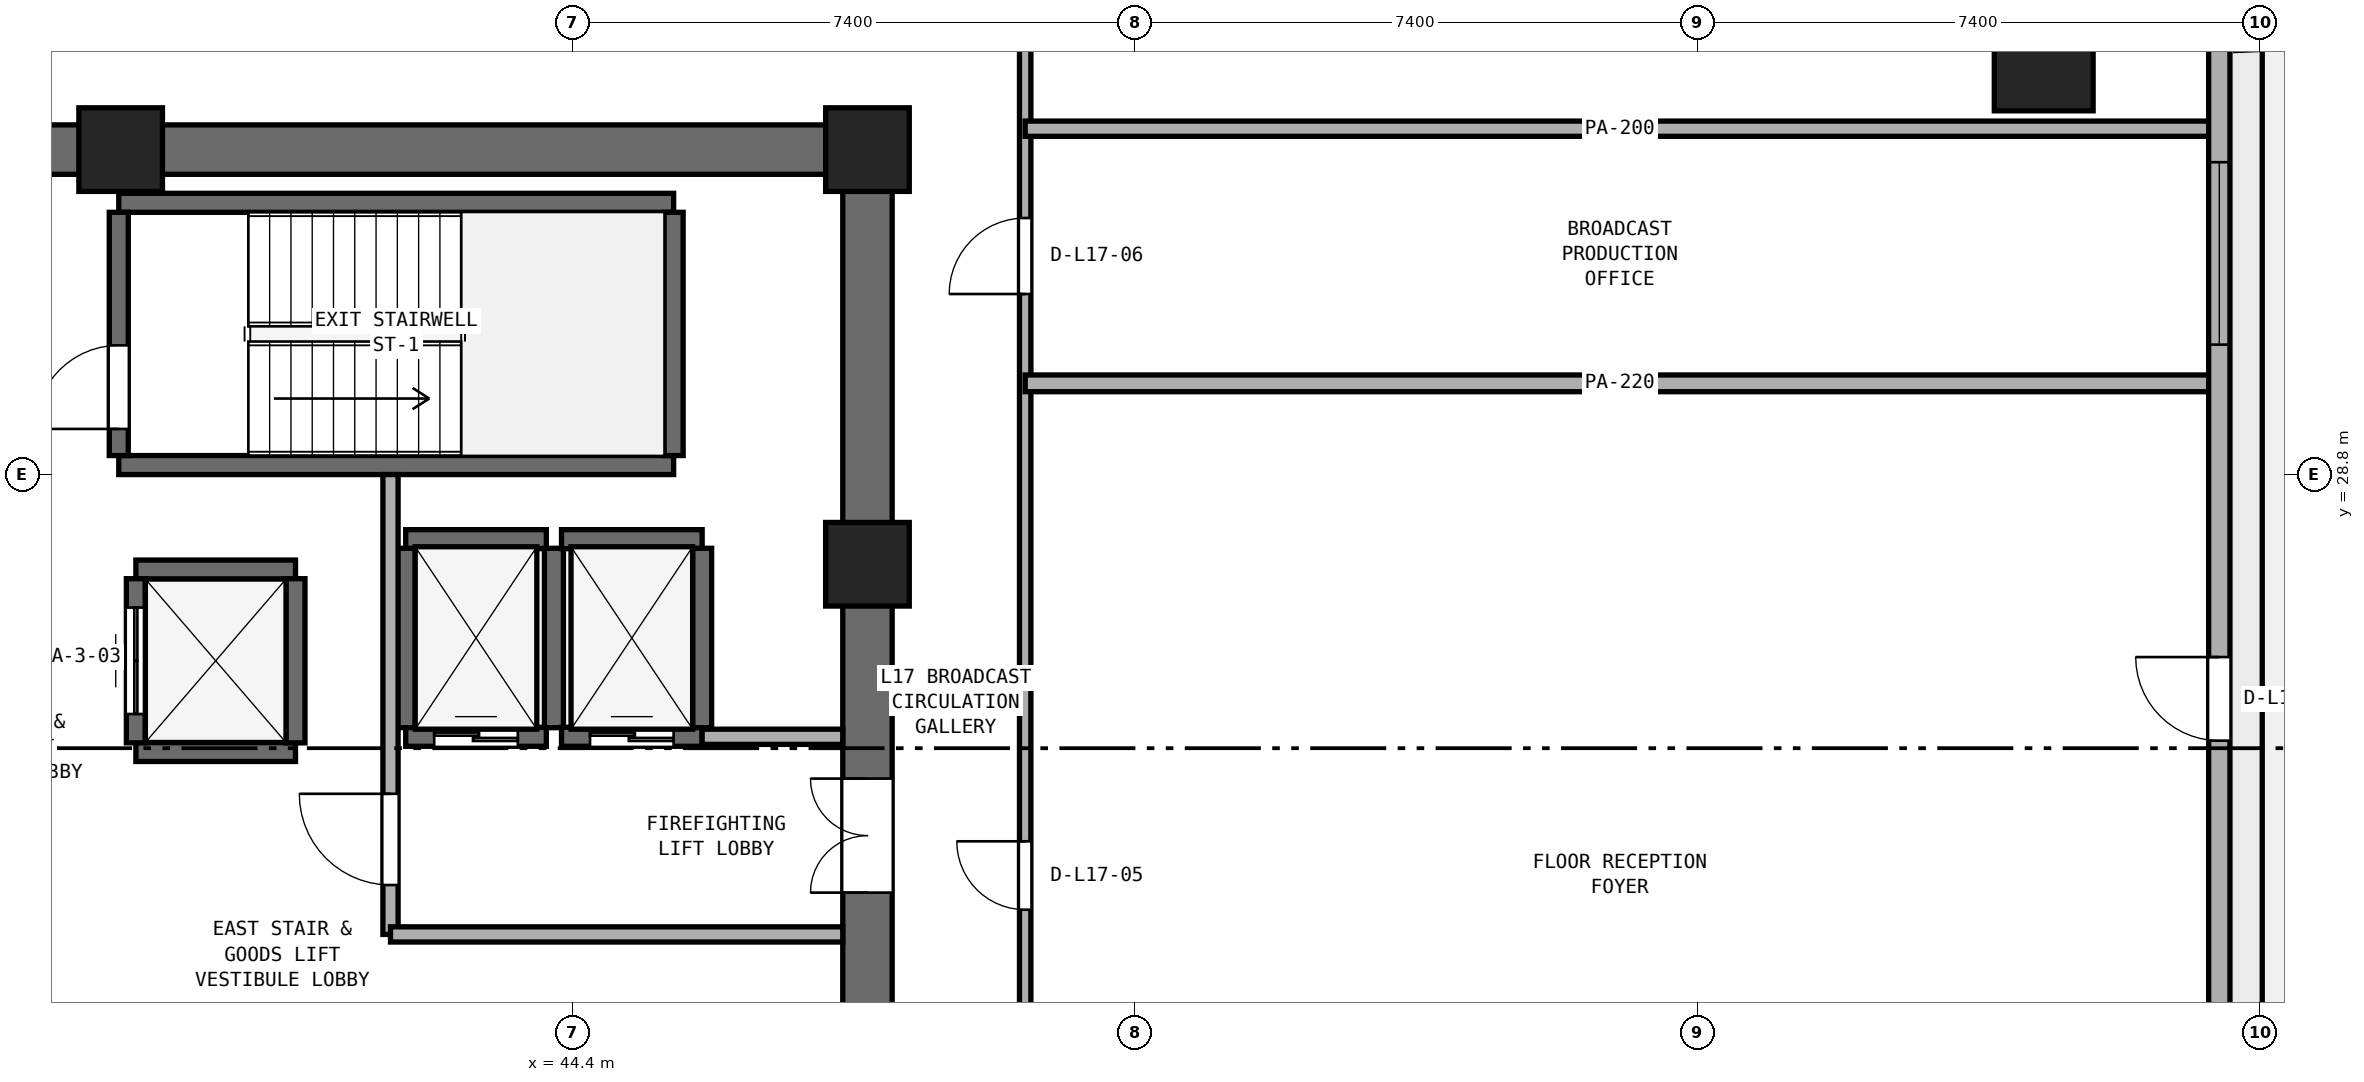
"""IFC4 building model, lengths in metres.
Left out: names, types, materials, properties, quantities, classifications, styles, units other than length and angle.
Written with IfcOpenShell. Run it as: python <this file> out.ifc"""

import sys

from ifc_helpers import new_model, si_unit, direction, frame, frame_2d, origin, origin_2d, place, context, subcontext, project, spatial, rectangle, extrude, element, fill, save


model = new_model("IFC4")
c1 = context("Model", 3, precision=1e-05, world=origin(), true_north=direction((0.0, 1.0)))
c2 = subcontext(c1, "Body", "Model", "MODEL_VIEW")
j1 = project(units=[si_unit("LENGTHUNIT", "METRE"), si_unit("PLANEANGLEUNIT", "RADIAN")], contexts=[c1])
p1 = place(None, origin())
s1 = spatial("IfcSite", under=j1, at=p1, CompositionType="ELEMENT")
p2 = place(p1, origin())
s2 = spatial("IfcBuilding", under=s1, at=p2, CompositionType="ELEMENT")
p3 = place(p2, frame((0.0, 0.0, 70.6)))
s3 = spatial("IfcBuildingStorey", under=s2, at=p3, CompositionType="ELEMENT", Elevation=70.6)
p4 = place(p3, frame((25.4, 33.075, 0.0), z_axis=(0.0, 0.0, 1.0), x_axis=(1.0, 0.0, 0.0)))
e1 = element("IfcWall", 1, at=p4, inside=s3, PredefinedType="SHEAR", context=c2, shape_type="SweptSolid", body=[
    extrude(rectangle(XDim=23.2, YDim=0.65, at=frame_2d((11.6, 0.0))), origin(), (0.0, 0.0, 1.0), 3.525),
])
p5 = place(p3, frame((48.275, 17.65, 0.0), z_axis=(0.0, 0.0, 1.0), x_axis=(0.0, 1.0, 0.0)))
e2 = element("IfcWall", 2, at=p5, inside=s3, PredefinedType="SHEAR", context=c2, shape_type="SweptSolid", body=[
    extrude(rectangle(XDim=15.1, YDim=0.65, at=frame_2d((7.55, 0.0))), origin(), (0.0, 0.0, 1.0), 3.525),
])
p6 = place(p5, frame((5.65, 0.0, 0.0)))
e3 = element("IfcOpeningElement", 3, at=p6, cuts=e2, PredefinedType="OPENING", context=c2, shape_type="SweptSolid", body=[
    extrude(rectangle(XDim=1.5, YDim=2.15, at=frame_2d((0.75, 1.075))), frame((0.0, 0.335, 0.0), z_axis=(0.0, -1.0, 0.0), x_axis=(1.0, 0.0, 0.0)), (0.0, 0.0, 1.0), 0.67),
])
for number, where, z_axis, x_axis in (
    (4, (48.275, 27.62, 0.0), (0.0, 0.0, 1.0), (1.0, 0.0, 0.0)),
    (5, (48.275, 33.075, 0.0), (0.0, 0.0, 1.0), (1.0, 0.0, 0.0)),
    (6, (38.45, 33.075, 0.0), (0.0, 0.0, 1.0), (1.0, 0.0, 0.0)),
):
    element("IfcColumn", number, at=place(p3, frame(where, z_axis=z_axis, x_axis=x_axis)), inside=s3, PredefinedType="PILASTER", context=c2, shape_type="SweptSolid", body=[
        extrude(rectangle(XDim=1.1, YDim=1.1, at=origin_2d()), origin(), (0.0, 0.0, 1.0), 3.8),
    ])
p7 = place(p3, frame((63.75, 34.235, 0.0), z_axis=(0.0, 0.0, 1.0), x_axis=(1.0, 0.0, 0.0)))
e7 = element("IfcColumn", 7, at=p7, inside=s3, PredefinedType="COLUMN", context=c2, shape_type="SweptSolid", body=[
    extrude(rectangle(XDim=1.3, YDim=1.3, at=origin_2d()), origin(), (0.0, 0.0, 1.0), 3.8),
])
for number, where, z_axis, x_axis in (
    (8, (38.425, 28.925, 0.0), (0.0, 0.0, 1.0), (1.0, 0.0, 0.0)),
    (9, (38.425, 32.375, 0.0), (0.0, 0.0, 1.0), (1.0, 0.0, 0.0)),
):
    element("IfcWall", number, at=place(p3, frame(where, z_axis=z_axis, x_axis=x_axis)), inside=s3, PredefinedType="SHEAR", context=c2, shape_type="SweptSolid", body=[
        extrude(rectangle(XDim=7.3, YDim=0.25, at=frame_2d((3.65, 0.0))), origin(), (0.0, 0.0, 1.0), 3.525),
    ])
p8 = place(p3, frame((38.425, 29.05, 0.0), z_axis=(0.0, 0.0, 1.0), x_axis=(0.0, 1.0, 0.0)))
e10 = element("IfcWall", 10, at=p8, inside=s3, PredefinedType="SHEAR", context=c2, shape_type="SweptSolid", body=[
    extrude(rectangle(XDim=3.2, YDim=0.25, at=frame_2d((1.6, 0.0))), origin(), (0.0, 0.0, 1.0), 3.525),
])
p9 = place(p8, frame((0.35, 0.0, 0.0)))
e11 = element("IfcOpeningElement", 11, at=p9, cuts=e10, PredefinedType="OPENING", context=c2, shape_type="SweptSolid", body=[
    extrude(rectangle(XDim=1.1, YDim=2.15, at=frame_2d((0.55, 1.075))), frame((0.0, 0.135, 0.0), z_axis=(0.0, -1.0, 0.0), x_axis=(1.0, 0.0, 0.0)), (0.0, 0.0, 1.0), 0.27),
])
p10 = place(p3, frame((45.725, 29.05, 0.0), z_axis=(0.0, 0.0, 1.0), x_axis=(0.0, 1.0, 0.0)))
e12 = element("IfcWall", 12, at=p10, inside=s3, PredefinedType="SHEAR", context=c2, shape_type="SweptSolid", body=[
    extrude(rectangle(XDim=3.2, YDim=0.25, at=frame_2d((1.6, 0.0))), origin(), (0.0, 0.0, 1.0), 3.525),
])
p11 = place(p3, frame((42.2, 25.35, 0.0), z_axis=(0.0, 0.0, 1.0), x_axis=(1.0, 0.0, 0.0)))
e13 = element("IfcWall", 13, at=p11, inside=s3, PredefinedType="SHEAR", context=c2, shape_type="SweptSolid", body=[
    extrude(rectangle(XDim=1.85, YDim=0.25, at=frame_2d((0.925, 0.0))), origin(), (0.0, 0.0, 1.0), 3.525),
])
p12 = place(p11, frame((0.375, 0.0, 0.0)))
e14 = element("IfcOpeningElement", 14, at=p12, cuts=e13, PredefinedType="OPENING", context=c2, shape_type="SweptSolid", body=[
    extrude(rectangle(XDim=1.1, YDim=2.15, at=frame_2d((0.55, 1.075))), frame((0.0, 0.135, 0.0), z_axis=(0.0, -1.0, 0.0), x_axis=(1.0, 0.0, 0.0)), (0.0, 0.0, 1.0), 0.27),
])
p13 = place(p3, frame((42.2, 27.95, 0.0), z_axis=(0.0, 0.0, 1.0), x_axis=(1.0, 0.0, 0.0)))
e15 = element("IfcWall", 15, at=p13, inside=s3, PredefinedType="SHEAR", context=c2, shape_type="SweptSolid", body=[
    extrude(rectangle(XDim=1.85, YDim=0.25, at=frame_2d((0.925, 0.0))), origin(), (0.0, 0.0, 1.0), 3.525),
])
for number, where, z_axis, x_axis in (
    (16, (42.2, 25.47, 0.0), (0.0, 0.0, 1.0), (0.0, 1.0, 0.0)),
    (17, (44.15, 25.47, 0.0), (0.0, 0.0, 1.0), (0.0, 1.0, 0.0)),
):
    element("IfcWall", number, at=place(p3, frame(where, z_axis=z_axis, x_axis=x_axis)), inside=s3, PredefinedType="SHEAR", context=c2, shape_type="SweptSolid", body=[
        extrude(rectangle(XDim=2.36, YDim=0.25, at=frame_2d((1.18, 0.0))), origin(), (0.0, 0.0, 1.0), 3.525),
    ])
p14 = place(p3, frame((44.25, 25.35, 0.0), z_axis=(0.0, 0.0, 1.0), x_axis=(1.0, 0.0, 0.0)))
e18 = element("IfcWall", 18, at=p14, inside=s3, PredefinedType="SHEAR", context=c2, shape_type="SweptSolid", body=[
    extrude(rectangle(XDim=1.85, YDim=0.25, at=frame_2d((0.925, 0.0))), origin(), (0.0, 0.0, 1.0), 3.525),
])
p15 = place(p14, frame((0.375, 0.0, 0.0)))
e19 = element("IfcOpeningElement", 19, at=p15, cuts=e18, PredefinedType="OPENING", context=c2, shape_type="SweptSolid", body=[
    extrude(rectangle(XDim=1.1, YDim=2.15, at=frame_2d((0.55, 1.075))), frame((0.0, 0.135, 0.0), z_axis=(0.0, -1.0, 0.0), x_axis=(1.0, 0.0, 0.0)), (0.0, 0.0, 1.0), 0.27),
])
p16 = place(p3, frame((44.25, 27.95, 0.0), z_axis=(0.0, 0.0, 1.0), x_axis=(1.0, 0.0, 0.0)))
e20 = element("IfcWall", 20, at=p16, inside=s3, PredefinedType="SHEAR", context=c2, shape_type="SweptSolid", body=[
    extrude(rectangle(XDim=1.85, YDim=0.25, at=frame_2d((0.925, 0.0))), origin(), (0.0, 0.0, 1.0), 3.525),
])
p17 = place(p3, frame((46.1, 25.47, 0.0), z_axis=(0.0, 0.0, 1.0), x_axis=(0.0, 1.0, 0.0)))
e21 = element("IfcWall", 21, at=p17, inside=s3, PredefinedType="SHEAR", context=c2, shape_type="SweptSolid", body=[
    extrude(rectangle(XDim=2.36, YDim=0.25, at=frame_2d((1.18, 0.0))), origin(), (0.0, 0.0, 1.0), 3.525),
])
for number, where, z_axis, x_axis in (
    (22, (38.65, 25.15, 0.0), (0.0, 0.0, 1.0), (1.0, 0.0, 0.0)),
    (23, (38.65, 27.55, 0.0), (0.0, 0.0, 1.0), (1.0, 0.0, 0.0)),
):
    element("IfcWall", number, at=place(p3, frame(where, z_axis=z_axis, x_axis=x_axis)), inside=s3, PredefinedType="SHEAR", context=c2, shape_type="SweptSolid", body=[
        extrude(rectangle(XDim=2.1, YDim=0.25, at=frame_2d((1.05, 0.0))), origin(), (0.0, 0.0, 1.0), 3.525),
    ])
p18 = place(p3, frame((38.65, 25.27, 0.0), z_axis=(0.0, 0.0, 1.0), x_axis=(0.0, 1.0, 0.0)))
e24 = element("IfcWall", 24, at=p18, inside=s3, PredefinedType="SHEAR", context=c2, shape_type="SweptSolid", body=[
    extrude(rectangle(XDim=2.16, YDim=0.25, at=frame_2d((1.08, 0.0))), origin(), (0.0, 0.0, 1.0), 3.525),
])
p19 = place(p18, frame((0.38, 0.0, 0.0)))
e25 = element("IfcOpeningElement", 25, at=p19, cuts=e24, PredefinedType="OPENING", context=c2, shape_type="SweptSolid", body=[
    extrude(rectangle(XDim=1.4, YDim=2.2, at=frame_2d((0.7, 1.1))), frame((0.0, 0.135, 0.0), z_axis=(0.0, -1.0, 0.0), x_axis=(1.0, 0.0, 0.0)), (0.0, 0.0, 1.0), 0.27),
])
p20 = place(p3, frame((40.75, 25.27, 0.0), z_axis=(0.0, 0.0, 1.0), x_axis=(0.0, 1.0, 0.0)))
e26 = element("IfcWall", 26, at=p20, inside=s3, PredefinedType="SHEAR", context=c2, shape_type="SweptSolid", body=[
    extrude(rectangle(XDim=2.16, YDim=0.25, at=frame_2d((1.08, 0.0))), origin(), (0.0, 0.0, 1.0), 3.525),
])
p21 = place(p3, frame((42.0, 22.75, 0.0), z_axis=(0.0, 0.0, 1.0), x_axis=(0.0, 1.0, 0.0)))
e27 = element("IfcWall", 27, at=p21, inside=s3, PredefinedType="SOLIDWALL", context=c2, shape_type="SweptSolid", body=[
    extrude(rectangle(XDim=6.05, YDim=0.2, at=frame_2d((3.025, 0.0))), origin(), (0.0, 0.0, 1.0), 3.525),
])
p22 = place(p21, frame((0.65, 0.0, 0.0)))
e28 = element("IfcOpeningElement", 28, at=p22, cuts=e27, PredefinedType="OPENING", context=c2, shape_type="SweptSolid", body=[
    extrude(rectangle(XDim=1.2, YDim=2.15, at=frame_2d((0.6, 1.075))), frame((0.0, 0.11, 0.0), z_axis=(0.0, -1.0, 0.0), x_axis=(1.0, 0.0, 0.0)), (0.0, 0.0, 1.0), 0.22),
])
p23 = place(p3, frame((42.0, 22.75, 0.0), z_axis=(0.0, 0.0, 1.0), x_axis=(1.0, 0.0, 0.0)))
e29 = element("IfcWall", 29, at=p23, inside=s3, PredefinedType="SOLIDWALL", context=c2, shape_type="SweptSolid", body=[
    extrude(rectangle(XDim=5.95, YDim=0.2, at=frame_2d((2.975, 0.0))), origin(), (0.0, 0.0, 1.0), 3.525),
])
p24 = place(p3, frame((46.1, 25.35, 0.0), z_axis=(0.0, 0.0, 1.0), x_axis=(1.0, 0.0, 0.0)))
e30 = element("IfcWall", 30, at=p24, inside=s3, PredefinedType="SOLIDWALL", context=c2, shape_type="SweptSolid", body=[
    extrude(rectangle(XDim=1.85, YDim=0.2, at=frame_2d((0.925, 0.0))), origin(), (0.0, 0.0, 1.0), 3.525),
])
p25 = place(p3, frame((50.35, 15.25, 0.0), z_axis=(0.0, 0.0, 1.0), x_axis=(0.0, 1.0, 0.0)))
e31 = element("IfcWall", 31, at=p25, inside=s3, PredefinedType="PARTITIONING", context=c2, shape_type="SweptSolid", body=[
    extrude(rectangle(XDim=19.9, YDim=0.15, at=frame_2d((9.95, 0.0))), origin(), (0.0, 0.0, 1.0), 3.525),
])
p26 = place(p25, frame((7.825, 0.0, 0.0)))
e32 = element("IfcOpeningElement", 32, at=p26, cuts=e31, PredefinedType="OPENING", context=c2, shape_type="SweptSolid", body=[
    extrude(rectangle(XDim=0.9, YDim=2.1, at=frame_2d((0.45, 1.05))), frame((0.0, 0.085, 0.0), z_axis=(0.0, -1.0, 0.0), x_axis=(1.0, 0.0, 0.0)), (0.0, 0.0, 1.0), 0.17),
])
p27 = place(p25, frame((15.925, 0.0, 0.0)))
e33 = element("IfcOpeningElement", 33, at=p27, cuts=e31, PredefinedType="OPENING", context=c2, shape_type="SweptSolid", body=[
    extrude(rectangle(XDim=1.0, YDim=2.12, at=frame_2d((0.5, 1.06))), frame((0.0, 0.085, 0.0), z_axis=(0.0, -1.0, 0.0), x_axis=(1.0, 0.0, 0.0)), (0.0, 0.0, 1.0), 0.17),
])
p28 = place(p3, frame((50.35, 30.0, 0.0), z_axis=(0.0, 0.0, 1.0), x_axis=(1.0, 0.0, 0.0)))
e34 = element("IfcWall", 34, at=p28, inside=s3, PredefinedType="PARTITIONING", context=c2, shape_type="SweptSolid", body=[
    extrude(rectangle(XDim=15.645, YDim=0.22, at=frame_2d((7.823, 0.0))), origin(), (0.0, 0.0, 1.0), 3.525),
])
p29 = place(p3, frame((50.35, 33.35, 0.0), z_axis=(0.0, 0.0, 1.0), x_axis=(1.0, 0.0, 0.0)))
e35 = element("IfcWall", 35, at=p29, inside=s3, PredefinedType="PARTITIONING", context=c2, shape_type="SweptSolid", body=[
    extrude(rectangle(XDim=15.645, YDim=0.2, at=frame_2d((7.823, 0.0))), origin(), (0.0, 0.0, 1.0), 2.908),
])
p30 = place(p3, frame((66.06, 16.183, 0.0), z_axis=(0.0, 0.0, 1.0), x_axis=(0.0, 1.0, 0.0)))
e36 = element("IfcWall", 36, at=p30, inside=s3, PredefinedType="STANDARD", context=c2, shape_type="SweptSolid", body=[
    extrude(rectangle(XDim=19.331, YDim=0.28, at=frame_2d((9.666, 0.0))), origin(), (0.0, 0.0, 1.0), 3.525),
])
p31 = place(p30, frame((9.115, 0.0, 0.0)))
e37 = element("IfcOpeningElement", 37, at=p31, cuts=e36, PredefinedType="OPENING", context=c2, shape_type="SweptSolid", body=[
    extrude(rectangle(XDim=1.1, YDim=2.2, at=frame_2d((0.55, 1.1))), frame((0.0, 0.15, 0.0), z_axis=(0.0, -1.0, 0.0), x_axis=(1.0, 0.0, 0.0)), (0.0, 0.0, 1.0), 0.3),
])
p32 = place(p30, frame((2.355, 0.0, 0.9)))
e38 = element("IfcOpeningElement", 38, at=p32, cuts=e36, PredefinedType="OPENING", context=c2, shape_type="SweptSolid", body=[
    extrude(rectangle(XDim=2.4, YDim=1.75, at=frame_2d((1.2, 0.875))), frame((0.0, 0.15, 0.0), z_axis=(0.0, -1.0, 0.0), x_axis=(1.0, 0.0, 0.0)), (0.0, 0.0, 1.0), 0.3),
])
p33 = place(p30, frame((14.326, 0.0, 0.9)))
e39 = element("IfcOpeningElement", 39, at=p33, cuts=e36, PredefinedType="OPENING", context=c2, shape_type="SweptSolid", body=[
    extrude(rectangle(XDim=2.4, YDim=1.75, at=frame_2d((1.2, 0.875))), frame((0.0, 0.15, 0.0), z_axis=(0.0, -1.0, 0.0), x_axis=(1.0, 0.0, 0.0)), (0.0, 0.0, 1.0), 0.3),
])
p34 = place(p9, origin())
e40 = element("IfcDoor", 40, at=p34, inside=s3, OperationType="SINGLE_SWING_LEFT", PredefinedType="DOOR", context=c2, shape_type="SweptSolid", body=[
    extrude(rectangle(XDim=1.1, YDim=2.15, at=frame_2d((0.55, 1.075))), frame((0.0, 0.025, 0.0), z_axis=(0.0, -1.0, 0.0), x_axis=(1.0, 0.0, 0.0)), (0.0, 0.0, 1.0), 0.05),
])
fill(e11, e40)
p35 = place(p12, origin())
e41 = element("IfcDoor", 41, at=p35, inside=s3, OperationType="DOUBLE_DOOR_SLIDING", PredefinedType="DOOR", context=c2, shape_type="SweptSolid", body=[
    extrude(rectangle(XDim=1.1, YDim=2.15, at=frame_2d((0.55, 1.075))), frame((0.0, 0.025, 0.0), z_axis=(0.0, -1.0, 0.0), x_axis=(1.0, 0.0, 0.0)), (0.0, 0.0, 1.0), 0.05),
])
fill(e14, e41)
p36 = place(p15, origin())
e42 = element("IfcDoor", 42, at=p36, inside=s3, OperationType="DOUBLE_DOOR_SLIDING", PredefinedType="DOOR", context=c2, shape_type="SweptSolid", body=[
    extrude(rectangle(XDim=1.1, YDim=2.15, at=frame_2d((0.55, 1.075))), frame((0.0, 0.025, 0.0), z_axis=(0.0, -1.0, 0.0), x_axis=(1.0, 0.0, 0.0)), (0.0, 0.0, 1.0), 0.05),
])
fill(e19, e42)
p37 = place(p19, origin())
e43 = element("IfcDoor", 43, at=p37, inside=s3, OperationType="DOUBLE_DOOR_SLIDING", PredefinedType="DOOR", context=c2, shape_type="SweptSolid", body=[
    extrude(rectangle(XDim=1.4, YDim=2.2, at=frame_2d((0.7, 1.1))), frame((0.0, 0.025, 0.0), z_axis=(0.0, -1.0, 0.0), x_axis=(1.0, 0.0, 0.0)), (0.0, 0.0, 1.0), 0.05),
])
fill(e25, e43)
p38 = place(p22, origin())
e44 = element("IfcDoor", 44, at=p38, inside=s3, OperationType="SINGLE_SWING_RIGHT", PredefinedType="DOOR", context=c2, shape_type="SweptSolid", body=[
    extrude(rectangle(XDim=1.2, YDim=2.15, at=frame_2d((0.6, 1.075))), frame((0.0, 0.025, 0.0), z_axis=(0.0, -1.0, 0.0), x_axis=(1.0, 0.0, 0.0)), (0.0, 0.0, 1.0), 0.05),
])
fill(e28, e44)
p39 = place(p6, origin())
e45 = element("IfcDoor", 45, at=p39, inside=s3, OperationType="DOUBLE_DOOR_SINGLE_SWING", PredefinedType="DOOR", context=c2, shape_type="SweptSolid", body=[
    extrude(rectangle(XDim=1.5, YDim=2.15, at=frame_2d((0.75, 1.075))), frame((0.0, 0.025, 0.0), z_axis=(0.0, -1.0, 0.0), x_axis=(1.0, 0.0, 0.0)), (0.0, 0.0, 1.0), 0.05),
])
fill(e3, e45)
p40 = place(p26, origin())
e46 = element("IfcDoor", 46, at=p40, inside=s3, OperationType="SINGLE_SWING_RIGHT", PredefinedType="DOOR", context=c2, shape_type="SweptSolid", body=[
    extrude(rectangle(XDim=0.9, YDim=2.1, at=frame_2d((0.45, 1.05))), frame((0.0, 0.025, 0.0), z_axis=(0.0, -1.0, 0.0), x_axis=(1.0, 0.0, 0.0)), (0.0, 0.0, 1.0), 0.05),
])
fill(e32, e46)
p41 = place(p27, origin())
e47 = element("IfcDoor", 47, at=p41, inside=s3, OperationType="SINGLE_SWING_LEFT", PredefinedType="DOOR", context=c2, shape_type="SweptSolid", body=[
    extrude(rectangle(XDim=1.0, YDim=2.12, at=frame_2d((0.5, 1.06))), frame((0.0, 0.025, 0.0), z_axis=(0.0, -1.0, 0.0), x_axis=(1.0, 0.0, 0.0)), (0.0, 0.0, 1.0), 0.05),
])
fill(e33, e47)
p42 = place(p31, origin())
e48 = element("IfcDoor", 48, at=p42, inside=s3, OperationType="SINGLE_SWING_RIGHT", PredefinedType="DOOR", context=c2, shape_type="SweptSolid", body=[
    extrude(rectangle(XDim=1.1, YDim=2.2, at=frame_2d((0.55, 1.1))), frame((0.0, 0.025, 0.0), z_axis=(0.0, -1.0, 0.0), x_axis=(1.0, 0.0, 0.0)), (0.0, 0.0, 1.0), 0.05),
])
fill(e37, e48)
p43 = place(p33, origin())
e49 = element("IfcWindow", 49, at=p43, inside=s3, PartitioningType="SINGLE_PANEL", PredefinedType="WINDOW", context=c2, shape_type="SweptSolid", body=[
    extrude(rectangle(XDim=2.4, YDim=1.75, at=frame_2d((1.2, 0.875))), frame((0.0, 0.03, 0.0), z_axis=(0.0, -1.0, 0.0), x_axis=(1.0, 0.0, 0.0)), (0.0, 0.0, 1.0), 0.06),
])
fill(e39, e49)
save(model, sys.argv[1])
